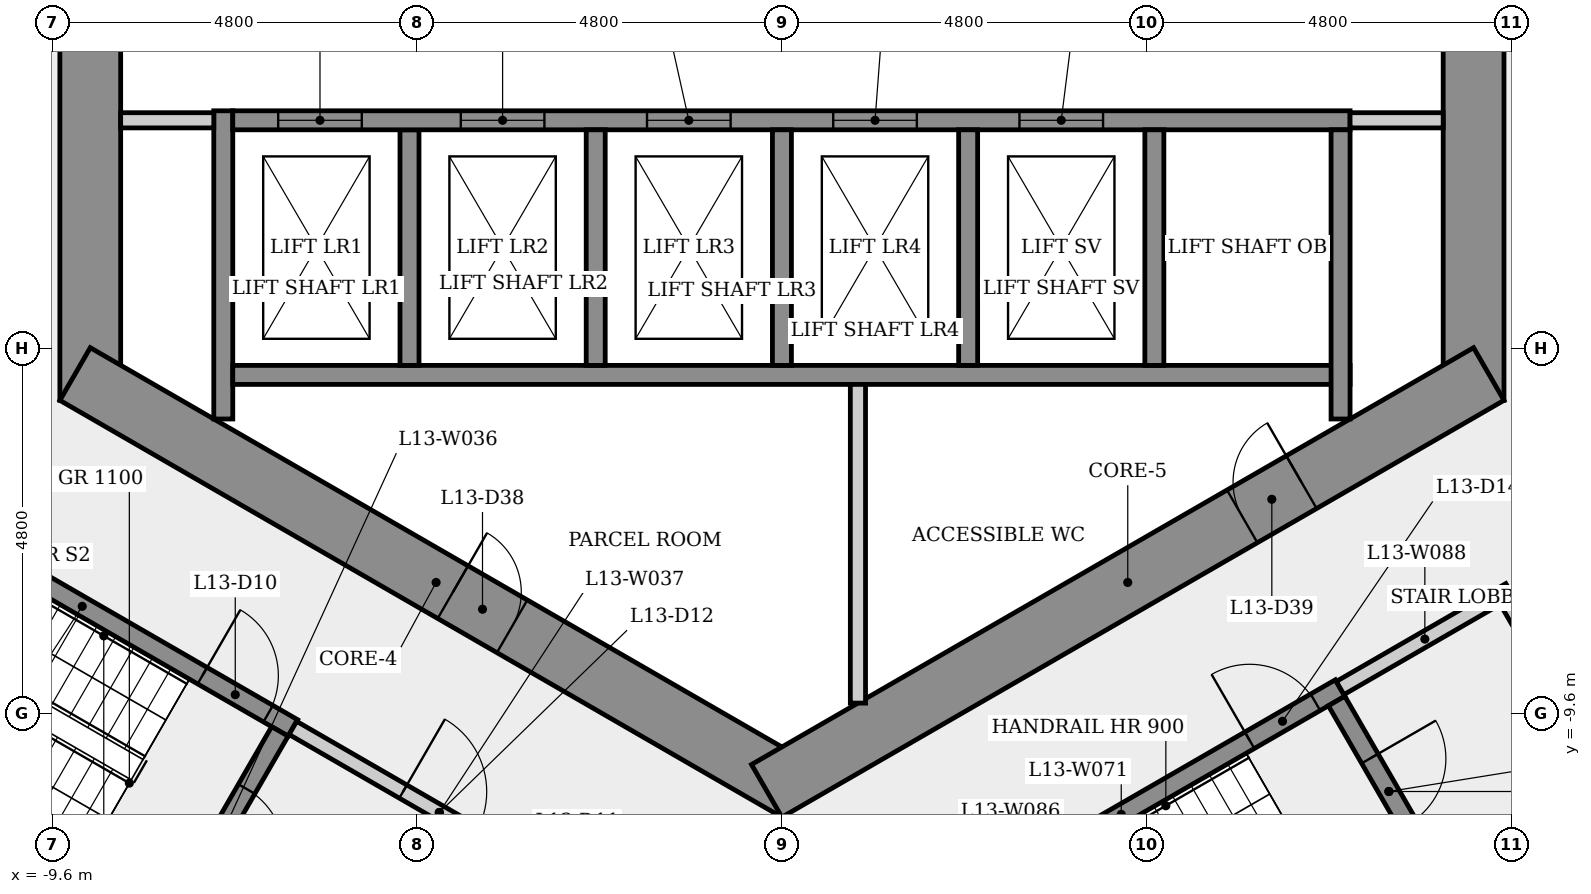
"""IFC4 building model, lengths in metres.
Left out: names, types, materials, properties, quantities, classifications, styles, units other than length and angle.
Written with IfcOpenShell. Run it as: python <this file> out.ifc"""

import sys

from ifc_helpers import new_model, si_unit, direction, frame, frame_2d, origin, place, context, subcontext, project, spatial, rectangle, extrude, element, fill, save


model = new_model("IFC4")
c1 = context("Model", 3, precision=1e-05, world=origin(), true_north=direction((0.0, 1.0)))
c2 = subcontext(c1, "Body", "Model", "MODEL_VIEW")
j1 = project(units=[si_unit("LENGTHUNIT", "METRE"), si_unit("PLANEANGLEUNIT", "RADIAN")], contexts=[c1])
p1 = place(None, origin())
s1 = spatial("IfcSite", under=j1, at=p1, CompositionType="ELEMENT")
p2 = place(p1, origin())
s2 = spatial("IfcBuilding", under=s1, at=p2, CompositionType="ELEMENT")
p3 = place(p2, frame((0.0, 0.0, 52.7)))
s3 = spatial("IfcBuildingStorey", under=s2, at=p3, CompositionType="ELEMENT", Elevation=52.7)
p4 = place(p3, frame((9.1, -5.485, 0.0), z_axis=(0.0, 0.0, 1.0), x_axis=(0.0, 1.0, 0.0)))
e1 = element("IfcWall", 1, at=p4, inside=s3, PredefinedType="SHEAR", context=c2, shape_type="SweptSolid", body=[
    extrude(rectangle(XDim=10.97, YDim=0.8, at=frame_2d((5.485, 0.0))), origin(), (0.0, 0.0, 1.0), 3.4),
])
p5 = place(p4, frame((4.685, 0.0, 0.0)))
e2 = element("IfcOpeningElement", 2, at=p5, cuts=e1, PredefinedType="OPENING", context=c2, shape_type="SweptSolid", body=[
    extrude(rectangle(XDim=1.6, YDim=2.1, at=frame_2d((0.8, 1.05))), frame((0.0, 0.41, 0.0), z_axis=(0.0, -1.0, 0.0), x_axis=(1.0, 0.0, 0.0)), (0.0, 0.0, 1.0), 0.82),
])
p6 = place(p3, frame((-9.1, 5.485, 0.0), z_axis=(0.0, 0.0, 1.0), x_axis=(0.0, -1.0, 0.0)))
e3 = element("IfcWall", 3, at=p6, inside=s3, PredefinedType="SHEAR", context=c2, shape_type="SweptSolid", body=[
    extrude(rectangle(XDim=10.97, YDim=0.8, at=frame_2d((5.485, 0.0))), origin(), (0.0, 0.0, 1.0), 3.4),
])
p7 = place(p6, frame((4.685, 0.0, 0.0)))
e4 = element("IfcOpeningElement", 4, at=p7, cuts=e3, PredefinedType="OPENING", context=c2, shape_type="SweptSolid", body=[
    extrude(rectangle(XDim=1.6, YDim=2.1, at=frame_2d((0.8, 1.05))), frame((0.0, 0.41, 0.0), z_axis=(0.0, -1.0, 0.0), x_axis=(1.0, 0.0, 0.0)), (0.0, 0.0, 1.0), 0.82),
])
p8 = place(p3, frame((-9.3, -5.138, 0.0), z_axis=(0.0, 0.0, 1.0), x_axis=(0.866023993627, -0.500002442456, 0.0)))
e5 = element("IfcWall", 5, at=p8, inside=s3, PredefinedType="SHEAR", context=c2, shape_type="SweptSolid", body=[
    extrude(rectangle(XDim=10.97, YDim=0.8, at=frame_2d((5.485, 0.0))), origin(), (0.0, 0.0, 1.0), 3.4),
])
p9 = place(p8, frame((5.74, 0.0, 0.0)))
e6 = element("IfcOpeningElement", 6, at=p9, cuts=e5, PredefinedType="OPENING", context=c2, shape_type="SweptSolid", body=[
    extrude(rectangle(XDim=0.9, YDim=2.1, at=frame_2d((0.45, 1.05))), frame((0.0, 0.41, 0.0), z_axis=(0.0, -1.0, 0.0), x_axis=(1.0, 0.0, 0.0)), (0.0, 0.0, 1.0), 0.82),
])
p10 = place(p3, frame((-0.2, -10.623, 0.0), z_axis=(0.0, 0.0, 1.0), x_axis=(0.866023993627, 0.500002442456, 0.0)))
e7 = element("IfcWall", 7, at=p10, inside=s3, PredefinedType="SHEAR", context=c2, shape_type="SweptSolid", body=[
    extrude(rectangle(XDim=10.97, YDim=0.8, at=frame_2d((5.485, 0.0))), origin(), (0.0, 0.0, 1.0), 3.4),
])
p11 = place(p10, frame((7.224, 0.0, 0.0)))
e8 = element("IfcOpeningElement", 8, at=p11, cuts=e7, PredefinedType="OPENING", context=c2, shape_type="SweptSolid", body=[
    extrude(rectangle(XDim=0.9, YDim=2.1, at=frame_2d((0.45, 1.05))), frame((0.0, 0.41, 0.0), z_axis=(0.0, -1.0, 0.0), x_axis=(1.0, 0.0, 0.0)), (0.0, 0.0, 1.0), 0.82),
])
p12 = place(p3, frame((-11.977, -6.595, 0.0), z_axis=(0.0, 0.0, 1.0), x_axis=(0.866025499775, -0.499999833739, 0.0)))
e9 = element("IfcWall", 9, at=p12, inside=s3, PredefinedType="SHEAR", context=c2, shape_type="SweptSolid", body=[
    extrude(rectangle(XDim=6.4, YDim=0.25, at=frame_2d((3.2, 0.0))), origin(), (0.0, 0.0, 1.0), 3.05),
])
p13 = place(p12, frame((5.025, 0.0, 0.0)))
e10 = element("IfcOpeningElement", 10, at=p13, cuts=e9, PredefinedType="OPENING", context=c2, shape_type="SweptSolid", body=[
    extrude(rectangle(XDim=1.0, YDim=2.1, at=frame_2d((0.5, 1.05))), frame((0.0, 0.135, 0.0), z_axis=(0.0, -1.0, 0.0), x_axis=(1.0, 0.0, 0.0)), (0.0, 0.0, 1.0), 0.27),
])
p14 = place(p3, frame((-7.935, -12.393, 0.0), z_axis=(0.0, 0.0, 1.0), x_axis=(-0.866025499775, 0.499999833739, 0.0)))
e11 = element("IfcWall", 11, at=p14, inside=s3, PredefinedType="SHEAR", context=c2, shape_type="SweptSolid", body=[
    extrude(rectangle(XDim=6.4, YDim=0.25, at=frame_2d((3.2, 0.0))), origin(), (0.0, 0.0, 1.0), 3.05),
])
p15 = place(p3, frame((-7.35, -5.73, 0.0), z_axis=(0.0, 0.0, 1.0), x_axis=(0.0, 1.0, 0.0)))
e12 = element("IfcWall", 12, at=p15, inside=s3, PredefinedType="SHEAR", context=c2, shape_type="SweptSolid", body=[
    extrude(rectangle(XDim=4.055, YDim=0.25, at=frame_2d((2.028, 0.0))), origin(), (0.0, 0.0, 1.0), 3.05),
])
p16 = place(p3, frame((-7.475, -1.8, 0.0), z_axis=(0.0, 0.0, 1.0), x_axis=(-1.0, 0.0, 0.0)))
e13 = element("IfcWall", 13, at=p16, inside=s3, PredefinedType="PARTITIONING", context=c2, shape_type="SweptSolid", body=[
    extrude(rectangle(XDim=1.225, YDim=0.2, at=frame_2d((0.613, 0.0))), origin(), (0.0, 0.0, 1.0), 3.05),
])
p17 = place(p3, frame((-6.605, -9.841, 0.0), z_axis=(0.0, 0.0, 1.0), x_axis=(-0.499996545922, -0.866027397988, 0.0)))
e14 = element("IfcWall", 14, at=p17, inside=s3, PredefinedType="SHEAR", context=c2, shape_type="SweptSolid", body=[
    extrude(rectangle(XDim=2.75, YDim=0.25, at=frame_2d((1.375, 0.0))), origin(), (0.0, 0.0, 1.0), 3.05),
])
p18 = place(p17, frame((0.875, 0.0, 0.0)))
e15 = element("IfcOpeningElement", 15, at=p18, cuts=e14, PredefinedType="OPENING", context=c2, shape_type="SweptSolid", body=[
    extrude(rectangle(XDim=1.0, YDim=2.1, at=frame_2d((0.5, 1.05))), frame((0.0, 0.135, 0.0), z_axis=(0.0, -1.0, 0.0), x_axis=(1.0, 0.0, 0.0)), (0.0, 0.0, 1.0), 0.27),
])
p19 = place(p3, frame((-6.435, -9.795, 0.0), z_axis=(0.0, 0.0, 1.0), x_axis=(0.866012907634, -0.500021643343, 0.0)))
e16 = element("IfcWall", 16, at=p19, inside=s3, PredefinedType="PARTITIONING", context=c2, shape_type="SweptSolid", body=[
    extrude(rectangle(XDim=4.45, YDim=0.2, at=frame_2d((2.225, 0.0))), origin(), (0.0, 0.0, 1.0), 3.05),
])
p20 = place(p19, frame((1.675, 0.0, 0.0)))
e17 = element("IfcOpeningElement", 17, at=p20, cuts=e16, PredefinedType="OPENING", context=c2, shape_type="SweptSolid", body=[
    extrude(rectangle(XDim=1.1, YDim=2.1, at=frame_2d((0.55, 1.05))), frame((0.0, 0.11, 0.0), z_axis=(0.0, -1.0, 0.0), x_axis=(1.0, 0.0, 0.0)), (0.0, 0.0, 1.0), 0.22),
])
p21 = place(p3, frame((-7.225, -5.15, 0.0), z_axis=(0.0, 0.0, 1.0), x_axis=(1.0, 0.0, 0.0)))
e18 = element("IfcWall", 18, at=p21, inside=s3, PredefinedType="SHEAR", context=c2, shape_type="SweptSolid", body=[
    extrude(rectangle(XDim=14.7, YDim=0.25, at=frame_2d((7.35, 0.0))), origin(), (0.0, 0.0, 1.0), 3.05),
])
p22 = place(p3, frame((-4.9, -1.925, 0.0), z_axis=(0.0, 0.0, 1.0), x_axis=(0.0, -1.0, 0.0)))
e19 = element("IfcWall", 19, at=p22, inside=s3, PredefinedType="SHEAR", context=c2, shape_type="SweptSolid", body=[
    extrude(rectangle(XDim=3.1, YDim=0.25, at=frame_2d((1.55, 0.0))), origin(), (0.0, 0.0, 1.0), 3.4),
])
p23 = place(p3, frame((-7.225, -1.8, 0.0), z_axis=(0.0, 0.0, 1.0), x_axis=(1.0, 0.0, 0.0)))
e20 = element("IfcWall", 20, at=p23, inside=s3, PredefinedType="SHEAR", context=c2, shape_type="SweptSolid", body=[
    extrude(rectangle(XDim=14.7, YDim=0.25, at=frame_2d((7.35, 0.0))), origin(), (0.0, 0.0, 1.0), 3.05),
])
p24 = place(p23, frame((0.597, 0.0, 0.0)))
e21 = element("IfcOpeningElement", 21, at=p24, cuts=e20, PredefinedType="OPENING", context=c2, shape_type="SweptSolid", body=[
    extrude(rectangle(XDim=1.1, YDim=2.1, at=frame_2d((0.55, 1.05))), frame((0.0, 0.135, 0.0), z_axis=(0.0, -1.0, 0.0), x_axis=(1.0, 0.0, 0.0)), (0.0, 0.0, 1.0), 0.27),
])
p25 = place(p23, frame((3.0, 0.0, 0.0)))
e22 = element("IfcOpeningElement", 22, at=p25, cuts=e20, PredefinedType="OPENING", context=c2, shape_type="SweptSolid", body=[
    extrude(rectangle(XDim=1.1, YDim=2.1, at=frame_2d((0.55, 1.05))), frame((0.0, 0.135, 0.0), z_axis=(0.0, -1.0, 0.0), x_axis=(1.0, 0.0, 0.0)), (0.0, 0.0, 1.0), 0.27),
])
p26 = place(p23, frame((5.45, 0.0, 0.0)))
e23 = element("IfcOpeningElement", 23, at=p26, cuts=e20, PredefinedType="OPENING", context=c2, shape_type="SweptSolid", body=[
    extrude(rectangle(XDim=1.1, YDim=2.1, at=frame_2d((0.55, 1.05))), frame((0.0, 0.135, 0.0), z_axis=(0.0, -1.0, 0.0), x_axis=(1.0, 0.0, 0.0)), (0.0, 0.0, 1.0), 0.27),
])
p27 = place(p23, frame((7.9, 0.0, 0.0)))
e24 = element("IfcOpeningElement", 24, at=p27, cuts=e20, PredefinedType="OPENING", context=c2, shape_type="SweptSolid", body=[
    extrude(rectangle(XDim=1.1, YDim=2.1, at=frame_2d((0.55, 1.05))), frame((0.0, 0.135, 0.0), z_axis=(0.0, -1.0, 0.0), x_axis=(1.0, 0.0, 0.0)), (0.0, 0.0, 1.0), 0.27),
])
p28 = place(p23, frame((10.35, 0.0, 0.0)))
e25 = element("IfcOpeningElement", 25, at=p28, cuts=e20, PredefinedType="OPENING", context=c2, shape_type="SweptSolid", body=[
    extrude(rectangle(XDim=1.1, YDim=2.1, at=frame_2d((0.55, 1.05))), frame((0.0, 0.135, 0.0), z_axis=(0.0, -1.0, 0.0), x_axis=(1.0, 0.0, 0.0)), (0.0, 0.0, 1.0), 0.27),
])
for number, where, z_axis, x_axis in (
    (26, (-2.45, -1.925, 0.0), (0.0, 0.0, 1.0), (0.0, -1.0, 0.0)),
    (27, (0.0, -1.925, 0.0), (0.0, 0.0, 1.0), (0.0, -1.0, 0.0)),
):
    element("IfcWall", number, at=place(p3, frame(where, z_axis=z_axis, x_axis=x_axis)), inside=s3, PredefinedType="SHEAR", context=c2, shape_type="SweptSolid", body=[
        extrude(rectangle(XDim=3.1, YDim=0.25, at=frame_2d((1.55, 0.0))), origin(), (0.0, 0.0, 1.0), 3.4),
    ])
p29 = place(p3, frame((1.0, -5.275, 0.0), z_axis=(0.0, 0.0, 1.0), x_axis=(0.0, -1.0, 0.0)))
e28 = element("IfcWall", 28, at=p29, inside=s3, PredefinedType="PARTITIONING", context=c2, shape_type="SweptSolid", body=[
    extrude(rectangle(XDim=4.194, YDim=0.2, at=frame_2d((2.097, 0.0))), origin(), (0.0, 0.0, 1.0), 3.05),
])
p30 = place(p3, frame((1.585, -12.595, 0.0), z_axis=(0.0, 0.0, 1.0), x_axis=(0.866036417653, 0.499980922934, 0.0)))
e29 = element("IfcWall", 29, at=p30, inside=s3, PredefinedType="SHEAR", context=c2, shape_type="SweptSolid", body=[
    extrude(rectangle(XDim=6.65, YDim=0.25, at=frame_2d((3.325, 0.0))), origin(), (0.0, 0.0, 1.0), 3.05),
])
p31 = place(p30, frame((5.275, 0.0, 0.0)))
e30 = element("IfcOpeningElement", 30, at=p31, cuts=e29, PredefinedType="OPENING", context=c2, shape_type="SweptSolid", body=[
    extrude(rectangle(XDim=1.0, YDim=2.1, at=frame_2d((0.5, 1.05))), frame((0.0, 0.135, 0.0), z_axis=(0.0, -1.0, 0.0), x_axis=(1.0, 0.0, 0.0)), (0.0, 0.0, 1.0), 0.27),
])
for number, where, z_axis, x_axis in (
    (31, (2.45, -1.925, 0.0), (0.0, 0.0, 1.0), (0.0, -1.0, 0.0)),
    (32, (4.9, -1.925, 0.0), (0.0, 0.0, 1.0), (0.0, -1.0, 0.0)),
):
    element("IfcWall", number, at=place(p3, frame(where, z_axis=z_axis, x_axis=x_axis)), inside=s3, PredefinedType="SHEAR", context=c2, shape_type="SweptSolid", body=[
        extrude(rectangle(XDim=3.1, YDim=0.25, at=frame_2d((1.55, 0.0))), origin(), (0.0, 0.0, 1.0), 3.4),
    ])
p32 = place(p3, frame((7.298, -9.441, 0.0), z_axis=(0.0, 0.0, 1.0), x_axis=(0.500034990121, -0.866005201286, 0.0)))
e33 = element("IfcWall", 33, at=p32, inside=s3, PredefinedType="SHEAR", context=c2, shape_type="SweptSolid", body=[
    extrude(rectangle(XDim=2.75, YDim=0.25, at=frame_2d((1.375, 0.0))), origin(), (0.0, 0.0, 1.0), 3.05),
])
p33 = place(p32, frame((0.875, 0.0, 0.0)))
e34 = element("IfcOpeningElement", 34, at=p33, cuts=e33, PredefinedType="OPENING", context=c2, shape_type="SweptSolid", body=[
    extrude(rectangle(XDim=1.0, YDim=2.1, at=frame_2d((0.5, 1.05))), frame((0.0, 0.135, 0.0), z_axis=(0.0, -1.0, 0.0), x_axis=(1.0, 0.0, 0.0)), (0.0, 0.0, 1.0), 0.27),
])
p34 = place(p3, frame((7.344, -9.27, 0.0), z_axis=(0.0, 0.0, 1.0), x_axis=(0.866005588531, 0.500034319456, 0.0)))
e35 = element("IfcWall", 35, at=p34, inside=s3, PredefinedType="PARTITIONING", context=c2, shape_type="SweptSolid", body=[
    extrude(rectangle(XDim=2.575, YDim=0.2, at=frame_2d((1.288, 0.0))), origin(), (0.0, 0.0, 1.0), 3.05),
])
p35 = place(p3, frame((7.35, -1.925, 0.0), z_axis=(0.0, 0.0, 1.0), x_axis=(0.0, -1.0, 0.0)))
e36 = element("IfcWall", 36, at=p35, inside=s3, PredefinedType="SHEAR", context=c2, shape_type="SweptSolid", body=[
    extrude(rectangle(XDim=3.805, YDim=0.25, at=frame_2d((1.903, 0.0))), origin(), (0.0, 0.0, 1.0), 3.05),
])
p36 = place(p3, frame((8.7, -1.8, 0.0), z_axis=(0.0, 0.0, 1.0), x_axis=(-1.0, 0.0, 0.0)))
e37 = element("IfcWall", 37, at=p36, inside=s3, PredefinedType="PARTITIONING", context=c2, shape_type="SweptSolid", body=[
    extrude(rectangle(XDim=1.225, YDim=0.2, at=frame_2d((0.613, 0.0))), origin(), (0.0, 0.0, 1.0), 3.05),
])
p37 = place(p3, frame((9.537, -8.119, 0.0), z_axis=(0.0, 0.0, 1.0), x_axis=(0.499990139034, -0.866031096941, 0.0)))
e38 = element("IfcWall", 38, at=p37, inside=s3, PredefinedType="PARTITIONING", context=c2, shape_type="SweptSolid", body=[
    extrude(rectangle(XDim=3.0, YDim=0.2, at=frame_2d((1.5, 0.0))), origin(), (0.0, 0.0, 1.0), 3.05),
])
p38 = place(p37, frame((0.935, 0.0, 0.0)))
e39 = element("IfcOpeningElement", 39, at=p38, cuts=e38, PredefinedType="OPENING", context=c2, shape_type="SweptSolid", body=[
    extrude(rectangle(XDim=1.0, YDim=2.1, at=frame_2d((0.5, 1.05))), frame((0.0, 0.11, 0.0), z_axis=(0.0, -1.0, 0.0), x_axis=(1.0, 0.0, 0.0)), (0.0, 0.0, 1.0), 0.22),
])
p39 = place(p3, frame((10.901, -10.681, 0.0), z_axis=(0.0, 0.0, 1.0), x_axis=(-0.866009402589, -0.500027713859, 0.0)))
e40 = element("IfcWall", 40, at=p39, inside=s3, PredefinedType="PARTITIONING", context=c2, shape_type="SweptSolid", body=[
    extrude(rectangle(XDim=2.1, YDim=0.2, at=frame_2d((1.05, 0.0))), origin(), (0.0, 0.0, 1.0), 3.05),
])
p40 = place(p24, origin())
e41 = element("IfcDoor", 41, at=p40, inside=s3, OperationType="SLIDING_TO_LEFT", PredefinedType="DOOR", context=c2, shape_type="SweptSolid", body=[
    extrude(rectangle(XDim=1.1, YDim=2.1, at=frame_2d((0.55, 1.05))), frame((0.0, 0.025, 0.0), z_axis=(0.0, -1.0, 0.0), x_axis=(1.0, 0.0, 0.0)), (0.0, 0.0, 1.0), 0.05),
])
fill(e21, e41)
p41 = place(p25, origin())
e42 = element("IfcDoor", 42, at=p41, inside=s3, OperationType="SLIDING_TO_LEFT", PredefinedType="DOOR", context=c2, shape_type="SweptSolid", body=[
    extrude(rectangle(XDim=1.1, YDim=2.1, at=frame_2d((0.55, 1.05))), frame((0.0, 0.025, 0.0), z_axis=(0.0, -1.0, 0.0), x_axis=(1.0, 0.0, 0.0)), (0.0, 0.0, 1.0), 0.05),
])
fill(e22, e42)
p42 = place(p26, origin())
e43 = element("IfcDoor", 43, at=p42, inside=s3, OperationType="SLIDING_TO_LEFT", PredefinedType="DOOR", context=c2, shape_type="SweptSolid", body=[
    extrude(rectangle(XDim=1.1, YDim=2.1, at=frame_2d((0.55, 1.05))), frame((0.0, 0.025, 0.0), z_axis=(0.0, -1.0, 0.0), x_axis=(1.0, 0.0, 0.0)), (0.0, 0.0, 1.0), 0.05),
])
fill(e23, e43)
p43 = place(p27, origin())
e44 = element("IfcDoor", 44, at=p43, inside=s3, OperationType="SLIDING_TO_LEFT", PredefinedType="DOOR", context=c2, shape_type="SweptSolid", body=[
    extrude(rectangle(XDim=1.1, YDim=2.1, at=frame_2d((0.55, 1.05))), frame((0.0, 0.025, 0.0), z_axis=(0.0, -1.0, 0.0), x_axis=(1.0, 0.0, 0.0)), (0.0, 0.0, 1.0), 0.05),
])
fill(e24, e44)
p44 = place(p28, origin())
e45 = element("IfcDoor", 45, at=p44, inside=s3, OperationType="SLIDING_TO_LEFT", PredefinedType="DOOR", context=c2, shape_type="SweptSolid", body=[
    extrude(rectangle(XDim=1.1, YDim=2.1, at=frame_2d((0.55, 1.05))), frame((0.0, 0.025, 0.0), z_axis=(0.0, -1.0, 0.0), x_axis=(1.0, 0.0, 0.0)), (0.0, 0.0, 1.0), 0.05),
])
fill(e25, e45)
p45 = place(p13, origin())
e46 = element("IfcDoor", 46, at=p45, inside=s3, OperationType="SINGLE_SWING_LEFT", PredefinedType="DOOR", context=c2, shape_type="SweptSolid", body=[
    extrude(rectangle(XDim=1.0, YDim=2.1, at=frame_2d((0.5, 1.05))), frame((0.0, 0.025, 0.0), z_axis=(0.0, -1.0, 0.0), x_axis=(1.0, 0.0, 0.0)), (0.0, 0.0, 1.0), 0.05),
])
fill(e10, e46)
p46 = place(p18, origin())
e47 = element("IfcDoor", 47, at=p46, inside=s3, OperationType="SINGLE_SWING_RIGHT", PredefinedType="DOOR", context=c2, shape_type="SweptSolid", body=[
    extrude(rectangle(XDim=1.0, YDim=2.1, at=frame_2d((0.5, 1.05))), frame((0.0, 0.025, 0.0), z_axis=(0.0, -1.0, 0.0), x_axis=(1.0, 0.0, 0.0)), (0.0, 0.0, 1.0), 0.05),
])
fill(e15, e47)
p47 = place(p20, origin())
e48 = element("IfcDoor", 48, at=p47, inside=s3, OperationType="SINGLE_SWING_LEFT", PredefinedType="DOOR", context=c2, shape_type="SweptSolid", body=[
    extrude(rectangle(XDim=1.1, YDim=2.1, at=frame_2d((0.55, 1.05))), frame((0.0, 0.025, 0.0), z_axis=(0.0, -1.0, 0.0), x_axis=(1.0, 0.0, 0.0)), (0.0, 0.0, 1.0), 0.05),
])
fill(e17, e48)
p48 = place(p31, origin())
e49 = element("IfcDoor", 49, at=p48, inside=s3, OperationType="SINGLE_SWING_LEFT", PredefinedType="DOOR", context=c2, shape_type="SweptSolid", body=[
    extrude(rectangle(XDim=1.0, YDim=2.1, at=frame_2d((0.5, 1.05))), frame((0.0, 0.025, 0.0), z_axis=(0.0, -1.0, 0.0), x_axis=(1.0, 0.0, 0.0)), (0.0, 0.0, 1.0), 0.05),
])
fill(e30, e49)
p49 = place(p33, origin())
e50 = element("IfcDoor", 50, at=p49, inside=s3, OperationType="SINGLE_SWING_LEFT", PredefinedType="DOOR", context=c2, shape_type="SweptSolid", body=[
    extrude(rectangle(XDim=1.0, YDim=2.1, at=frame_2d((0.5, 1.05))), frame((0.0, 0.025, 0.0), z_axis=(0.0, -1.0, 0.0), x_axis=(1.0, 0.0, 0.0)), (0.0, 0.0, 1.0), 0.05),
])
fill(e34, e50)
p50 = place(p9, origin())
e51 = element("IfcDoor", 51, at=p50, inside=s3, OperationType="SINGLE_SWING_LEFT", PredefinedType="DOOR", context=c2, shape_type="SweptSolid", body=[
    extrude(rectangle(XDim=0.9, YDim=2.1, at=frame_2d((0.45, 1.05))), frame((0.0, 0.025, 0.0), z_axis=(0.0, -1.0, 0.0), x_axis=(1.0, 0.0, 0.0)), (0.0, 0.0, 1.0), 0.05),
])
fill(e6, e51)
p51 = place(p11, origin())
e52 = element("IfcDoor", 52, at=p51, inside=s3, OperationType="SINGLE_SWING_RIGHT", PredefinedType="DOOR", context=c2, shape_type="SweptSolid", body=[
    extrude(rectangle(XDim=0.9, YDim=2.1, at=frame_2d((0.45, 1.05))), frame((0.0, 0.025, 0.0), z_axis=(0.0, -1.0, 0.0), x_axis=(1.0, 0.0, 0.0)), (0.0, 0.0, 1.0), 0.05),
])
fill(e8, e52)
save(model, sys.argv[1])
